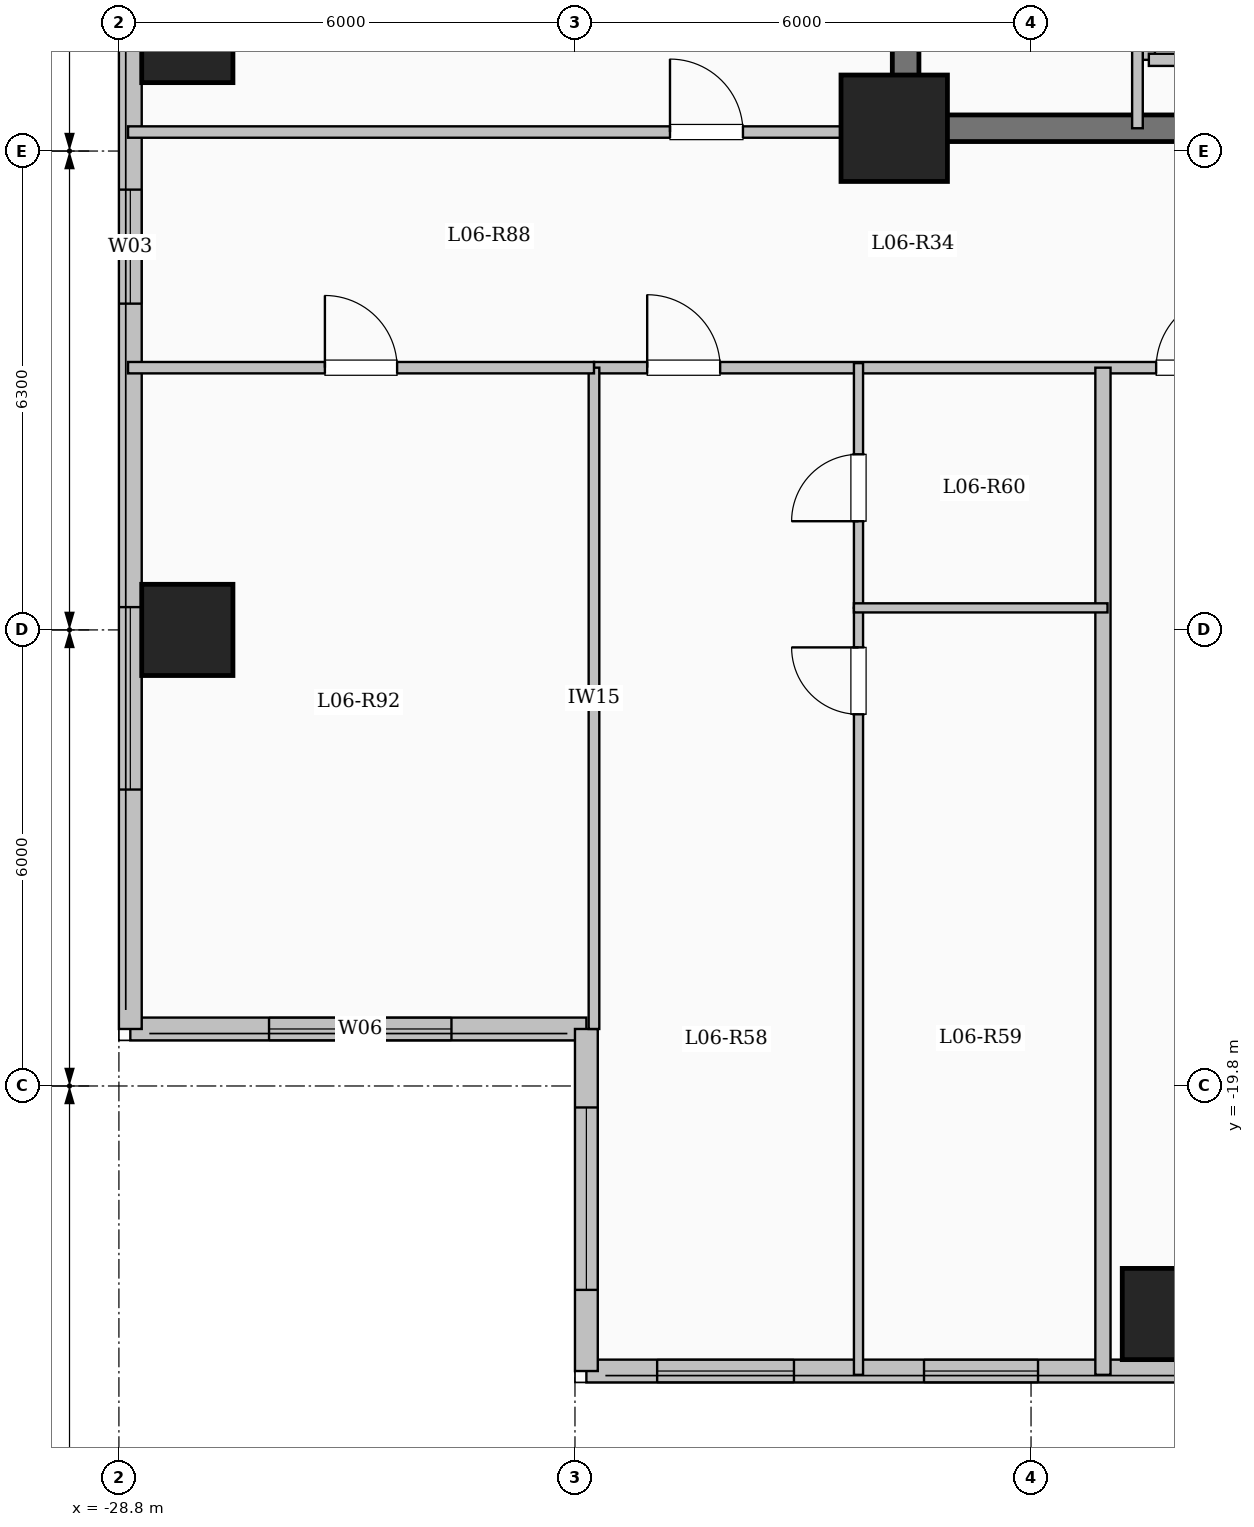
"""IFC4 building model, lengths in metres.
Left out: names, types, materials, properties, quantities, classifications, styles, units other than length and angle.
Written with IfcOpenShell. Run it as: python <this file> out.ifc"""

import sys

from ifc_helpers import new_model, si_unit, direction, frame, frame_2d, origin, origin_2d, place, context, subcontext, project, spatial, rectangle, extrude, element, fill, save


model = new_model("IFC4")
c1 = context("Model", 3, precision=1e-05, world=origin(), true_north=direction((0.0, 1.0)))
c2 = subcontext(c1, "Body", "Model", "MODEL_VIEW")
j1 = project(units=[si_unit("LENGTHUNIT", "METRE"), si_unit("PLANEANGLEUNIT", "RADIAN")], contexts=[c1])
p1 = place(None, origin())
s1 = spatial("IfcSite", under=j1, at=p1, CompositionType="ELEMENT")
p2 = place(p1, origin())
s2 = spatial("IfcBuilding", under=s1, at=p2, CompositionType="ELEMENT")
p3 = place(p2, frame((0.0, 0.0, 27.35)))
s3 = spatial("IfcBuildingStorey", under=s2, at=p3, CompositionType="ELEMENT", Elevation=27.35)
p4 = place(p3, frame((-18.6, -7.2, 0.0), z_axis=(0.0, 0.0, 1.0), x_axis=(1.0, 0.0, 0.0)))
e1 = element("IfcColumn", 1, at=p4, inside=s3, PredefinedType="COLUMN", context=c2, shape_type="SweptSolid", body=[
    extrude(rectangle(XDim=1.4, YDim=1.4, at=origin_2d()), origin(), (0.0, 0.0, 1.0), 3.35),
])
for number, where, z_axis, x_axis in (
    (2, (-15.0, -22.8, 0.0), (0.0, 0.0, 1.0), (1.0, 0.0, 0.0)),
    (3, (-27.9, -13.8, 0.0), (0.0, 0.0, 1.0), (1.0, 0.0, 0.0)),
    (4, (-27.9, -6.0, 0.0), (0.0, 0.0, 1.0), (1.0, 0.0, 0.0)),
):
    element("IfcColumn", number, at=place(p3, frame(where, z_axis=z_axis, x_axis=x_axis)), inside=s3, PredefinedType="COLUMN", context=c2, shape_type="SweptSolid", body=[
        extrude(rectangle(XDim=1.2, YDim=1.2, at=origin_2d()), origin(), (0.0, 0.0, 1.0), 3.35),
    ])
p5 = place(p3, frame((-22.65, -19.05, 0.0), z_axis=(0.0, 0.0, 1.0), x_axis=(-1.0, 0.0, 0.0)))
e5 = element("IfcWall", 5, at=p5, inside=s3, PredefinedType="SOLIDWALL", context=c2, shape_type="SweptSolid", body=[
    extrude(rectangle(XDim=6.0, YDim=0.3, at=frame_2d((3.0, 0.0))), origin(), (0.0, 0.0, 1.0), 3.1),
])
p6 = place(p5, frame((1.775, 0.0, 0.9)))
e6 = element("IfcOpeningElement", 6, at=p6, cuts=e5, PredefinedType="OPENING", context=c2, shape_type="SweptSolid", body=[
    extrude(rectangle(XDim=2.4, YDim=1.8, at=frame_2d((1.2, 0.9))), frame((0.0, 0.16, 0.0), z_axis=(0.0, -1.0, 0.0), x_axis=(1.0, 0.0, 0.0)), (0.0, 0.0, 1.0), 0.32),
])
p7 = place(p3, frame((-28.65, -19.05, 0.0), z_axis=(0.0, 0.0, 1.0), x_axis=(0.0, 1.0, 0.0)))
e7 = element("IfcWall", 7, at=p7, inside=s3, PredefinedType="SOLIDWALL", context=c2, shape_type="SweptSolid", body=[
    extrude(rectangle(XDim=38.1, YDim=0.3, at=frame_2d((19.05, 0.0))), origin(), (0.0, 0.0, 1.0), 3.1),
])
p8 = place(p7, frame((3.15, 0.0, 0.9)))
e8 = element("IfcOpeningElement", 8, at=p8, cuts=e7, PredefinedType="OPENING", context=c2, shape_type="SweptSolid", body=[
    extrude(rectangle(XDim=2.4, YDim=1.8, at=frame_2d((1.2, 0.9))), frame((0.0, 0.16, 0.0), z_axis=(0.0, -1.0, 0.0), x_axis=(1.0, 0.0, 0.0)), (0.0, 0.0, 1.0), 0.32),
])
p9 = place(p7, frame((9.542, 0.0, 0.9)))
e9 = element("IfcOpeningElement", 9, at=p9, cuts=e7, PredefinedType="OPENING", context=c2, shape_type="SweptSolid", body=[
    extrude(rectangle(XDim=1.5, YDim=1.65, at=frame_2d((0.75, 0.825))), frame((0.0, 0.16, 0.0), z_axis=(0.0, -1.0, 0.0), x_axis=(1.0, 0.0, 0.0)), (0.0, 0.0, 1.0), 0.32),
])
p10 = place(p7, frame((14.95, 0.0, 0.9)))
e10 = element("IfcOpeningElement", 10, at=p10, cuts=e7, PredefinedType="OPENING", context=c2, shape_type="SweptSolid", body=[
    extrude(rectangle(XDim=2.4, YDim=1.8, at=frame_2d((1.2, 0.9))), frame((0.0, 0.16, 0.0), z_axis=(0.0, -1.0, 0.0), x_axis=(1.0, 0.0, 0.0)), (0.0, 0.0, 1.0), 0.32),
])
p11 = place(p7, frame((21.375, 0.0, 0.9)))
e11 = element("IfcOpeningElement", 11, at=p11, cuts=e7, PredefinedType="OPENING", context=c2, shape_type="SweptSolid", body=[
    extrude(rectangle(XDim=1.8, YDim=1.65, at=frame_2d((0.9, 0.825))), frame((0.0, 0.16, 0.0), z_axis=(0.0, -1.0, 0.0), x_axis=(1.0, 0.0, 0.0)), (0.0, 0.0, 1.0), 0.32),
])
p12 = place(p7, frame((25.925, 0.0, 0.9)))
e12 = element("IfcOpeningElement", 12, at=p12, cuts=e7, PredefinedType="OPENING", context=c2, shape_type="SweptSolid", body=[
    extrude(rectangle(XDim=2.0, YDim=1.7, at=frame_2d((1.0, 0.85))), frame((0.0, 0.16, 0.0), z_axis=(0.0, -1.0, 0.0), x_axis=(1.0, 0.0, 0.0)), (0.0, 0.0, 1.0), 0.32),
])
p13 = place(p7, frame((30.175, 0.0, 0.95)))
e13 = element("IfcOpeningElement", 13, at=p13, cuts=e7, PredefinedType="OPENING", context=c2, shape_type="SweptSolid", body=[
    extrude(rectangle(XDim=1.0, YDim=1.5, at=frame_2d((0.5, 0.75))), frame((0.0, 0.16, 0.0), z_axis=(0.0, -1.0, 0.0), x_axis=(1.0, 0.0, 0.0)), (0.0, 0.0, 1.0), 0.32),
])
p14 = place(p7, frame((33.85, 0.0, 0.9)))
e14 = element("IfcOpeningElement", 14, at=p14, cuts=e7, PredefinedType="OPENING", context=c2, shape_type="SweptSolid", body=[
    extrude(rectangle(XDim=2.0, YDim=1.7, at=frame_2d((1.0, 0.85))), frame((0.0, 0.16, 0.0), z_axis=(0.0, -1.0, 0.0), x_axis=(1.0, 0.0, 0.0)), (0.0, 0.0, 1.0), 0.32),
])
p15 = place(p3, frame((-7.35, -23.55, 0.0), z_axis=(0.0, 0.0, 1.0), x_axis=(-1.0, 0.0, 0.0)))
e15 = element("IfcWall", 15, at=p15, inside=s3, PredefinedType="SOLIDWALL", context=c2, shape_type="SweptSolid", body=[
    extrude(rectangle(XDim=15.3, YDim=0.3, at=frame_2d((7.65, 0.0))), origin(), (0.0, 0.0, 1.0), 3.1),
])
p16 = place(p15, frame((0.147, 0.0, 0.95)))
e16 = element("IfcOpeningElement", 16, at=p16, cuts=e15, PredefinedType="OPENING", context=c2, shape_type="SweptSolid", body=[
    extrude(rectangle(XDim=0.85, YDim=1.5, at=frame_2d((0.425, 0.75))), frame((0.0, 0.16, 0.0), z_axis=(0.0, -1.0, 0.0), x_axis=(1.0, 0.0, 0.0)), (0.0, 0.0, 1.0), 0.32),
])
p17 = place(p15, frame((2.085, 0.0, 0.9)))
e17 = element("IfcOpeningElement", 17, at=p17, cuts=e15, PredefinedType="OPENING", context=c2, shape_type="SweptSolid", body=[
    extrude(rectangle(XDim=1.8, YDim=1.65, at=frame_2d((0.9, 0.825))), frame((0.0, 0.16, 0.0), z_axis=(0.0, -1.0, 0.0), x_axis=(1.0, 0.0, 0.0)), (0.0, 0.0, 1.0), 0.32),
])
p18 = place(p15, frame((5.722, 0.0, 0.9)))
e18 = element("IfcOpeningElement", 18, at=p18, cuts=e15, PredefinedType="OPENING", context=c2, shape_type="SweptSolid", body=[
    extrude(rectangle(XDim=1.8, YDim=1.65, at=frame_2d((0.9, 0.825))), frame((0.0, 0.16, 0.0), z_axis=(0.0, -1.0, 0.0), x_axis=(1.0, 0.0, 0.0)), (0.0, 0.0, 1.0), 0.32),
])
p19 = place(p15, frame((9.358, 0.0, 0.9)))
e19 = element("IfcOpeningElement", 19, at=p19, cuts=e15, PredefinedType="OPENING", context=c2, shape_type="SweptSolid", body=[
    extrude(rectangle(XDim=1.5, YDim=1.65, at=frame_2d((0.75, 0.825))), frame((0.0, 0.16, 0.0), z_axis=(0.0, -1.0, 0.0), x_axis=(1.0, 0.0, 0.0)), (0.0, 0.0, 1.0), 0.32),
])
p20 = place(p15, frame((12.569, 0.0, 0.9)))
e20 = element("IfcOpeningElement", 20, at=p20, cuts=e15, PredefinedType="OPENING", context=c2, shape_type="SweptSolid", body=[
    extrude(rectangle(XDim=1.8, YDim=1.65, at=frame_2d((0.9, 0.825))), frame((0.0, 0.16, 0.0), z_axis=(0.0, -1.0, 0.0), x_axis=(1.0, 0.0, 0.0)), (0.0, 0.0, 1.0), 0.32),
])
p21 = place(p3, frame((-22.65, -23.55, 0.0), z_axis=(0.0, 0.0, 1.0), x_axis=(0.0, 1.0, 0.0)))
e21 = element("IfcWall", 21, at=p21, inside=s3, PredefinedType="SOLIDWALL", context=c2, shape_type="SweptSolid", body=[
    extrude(rectangle(XDim=4.5, YDim=0.3, at=frame_2d((2.25, 0.0))), origin(), (0.0, 0.0, 1.0), 3.1),
])
p22 = place(p21, frame((1.067, 0.0, 0.9)))
e22 = element("IfcOpeningElement", 22, at=p22, cuts=e21, PredefinedType="OPENING", context=c2, shape_type="SweptSolid", body=[
    extrude(rectangle(XDim=2.4, YDim=1.8, at=frame_2d((1.2, 0.9))), frame((0.0, 0.16, 0.0), z_axis=(0.0, -1.0, 0.0), x_axis=(1.0, 0.0, 0.0)), (0.0, 0.0, 1.0), 0.32),
])
p23 = place(p3, frame((-15.25, -6.3, 0.0), z_axis=(0.0, 0.0, 1.0), x_axis=(0.0, 1.0, 0.0)))
e23 = element("IfcWall", 23, at=p23, inside=s3, PredefinedType="SOLIDWALL", context=c2, shape_type="SweptSolid", body=[
    extrude(rectangle(XDim=2.6, YDim=0.16, at=frame_2d((1.3, 0.0))), origin(), (0.0, 0.0, 1.0), 3.1),
])
p24 = place(p3, frame((-15.25, -6.3, 0.0), z_axis=(0.0, 0.0, 1.0), x_axis=(1.0, 0.0, 0.0)))
e24 = element("IfcWall", 24, at=p24, inside=s3, PredefinedType="SOLIDWALL", context=c2, shape_type="SweptSolid", body=[
    extrude(rectangle(XDim=2.3, YDim=0.16, at=frame_2d((1.15, 0.0))), origin(), (0.0, 0.0, 1.0), 3.1),
])
p25 = place(p3, frame((-18.45, -7.375, 0.0), z_axis=(0.0, 0.0, 1.0), x_axis=(0.0, 1.0, 0.0)))
e25 = element("IfcWall", 25, at=p25, inside=s3, PredefinedType="SHEAR", context=c2, shape_type="SweptSolid", body=[
    extrude(rectangle(XDim=14.05, YDim=0.35, at=frame_2d((7.025, 0.0))), origin(), (0.0, 0.0, 1.0), 3.35),
])
p26 = place(p3, frame((-18.625, -7.2, 0.0), z_axis=(0.0, 0.0, 1.0), x_axis=(1.0, 0.0, 0.0)))
e26 = element("IfcWall", 26, at=p26, inside=s3, PredefinedType="SHEAR", context=c2, shape_type="SweptSolid", body=[
    extrude(rectangle(XDim=8.55, YDim=0.35, at=frame_2d((4.275, 0.0))), origin(), (0.0, 0.0, 1.0), 3.35),
])
p27 = place(p3, frame((-15.4, -7.2, 0.0), z_axis=(0.0, 0.0, 1.0), x_axis=(0.0, 1.0, 0.0)))
e27 = element("IfcWall", 27, at=p27, inside=s3, PredefinedType="PARTITIONING", context=c2, shape_type="SweptSolid", body=[
    extrude(rectangle(XDim=10.45, YDim=0.14, at=frame_2d((5.225, 0.0))), origin(), (0.0, 0.0, 1.0), 3.1),
])
p28 = place(p27, frame((9.25, 0.0, 0.0)))
e28 = element("IfcOpeningElement", 28, at=p28, cuts=e27, PredefinedType="OPENING", context=c2, shape_type="SweptSolid", body=[
    extrude(rectangle(XDim=0.9, YDim=2.08, at=frame_2d((0.45, 1.04))), frame((0.0, 0.08, 0.0), z_axis=(0.0, -1.0, 0.0), x_axis=(1.0, 0.0, 0.0)), (0.0, 0.0, 1.0), 0.16),
])
p29 = place(p3, frame((-22.55, -10.35, 0.0), z_axis=(0.0, 0.0, 1.0), x_axis=(1.0, 0.0, 0.0)))
e29 = element("IfcWall", 29, at=p29, inside=s3, PredefinedType="PARTITIONING", context=c2, shape_type="SweptSolid", body=[
    extrude(rectangle(XDim=14.0, YDim=0.15, at=frame_2d((7.0, 0.0))), origin(), (0.0, 0.0, 1.0), 3.1),
])
p30 = place(p29, frame((0.7, 0.0, 0.0)))
e30 = element("IfcOpeningElement", 30, at=p30, cuts=e29, PredefinedType="OPENING", context=c2, shape_type="SweptSolid", body=[
    extrude(rectangle(XDim=0.96, YDim=2.15, at=frame_2d((0.48, 1.075))), frame((0.0, 0.085, 0.0), z_axis=(0.0, -1.0, 0.0), x_axis=(1.0, 0.0, 0.0)), (0.0, 0.0, 1.0), 0.17),
])
p31 = place(p29, frame((7.396, 0.0, 0.0)))
e31 = element("IfcOpeningElement", 31, at=p31, cuts=e29, PredefinedType="OPENING", context=c2, shape_type="SweptSolid", body=[
    extrude(rectangle(XDim=0.96, YDim=2.15, at=frame_2d((0.48, 1.075))), frame((0.0, 0.085, 0.0), z_axis=(0.0, -1.0, 0.0), x_axis=(1.0, 0.0, 0.0)), (0.0, 0.0, 1.0), 0.17),
])
p32 = place(p3, frame((-15.854, -23.6, 0.0), z_axis=(0.0, 0.0, 1.0), x_axis=(0.0, 1.0, 0.0)))
e32 = element("IfcWall", 32, at=p32, inside=s3, PredefinedType="SOLIDWALL", context=c2, shape_type="SweptSolid", body=[
    extrude(rectangle(XDim=13.25, YDim=0.2, at=frame_2d((6.625, 0.0))), origin(), (0.0, 0.0, 1.0), 3.1),
])
p33 = place(p3, frame((-19.07, -23.6, 0.0), z_axis=(0.0, 0.0, 1.0), x_axis=(0.0, 1.0, 0.0)))
e33 = element("IfcWall", 33, at=p33, inside=s3, PredefinedType="PARTITIONING", context=c2, shape_type="SweptSolid", body=[
    extrude(rectangle(XDim=10.09, YDim=0.12, at=frame_2d((5.045, 0.0))), origin(), (0.0, 0.0, 1.0), 3.1),
])
p34 = place(p33, frame((8.69, 0.0, 0.0)))
e34 = element("IfcOpeningElement", 34, at=p34, cuts=e33, PredefinedType="OPENING", context=c2, shape_type="SweptSolid", body=[
    extrude(rectangle(XDim=0.88, YDim=2.1, at=frame_2d((0.44, 1.05))), frame((0.0, 0.07, 0.0), z_axis=(0.0, -1.0, 0.0), x_axis=(1.0, 0.0, 0.0)), (0.0, 0.0, 1.0), 0.14),
])
p35 = place(p3, frame((-19.07, -13.51, 0.0), z_axis=(0.0, 0.0, 1.0), x_axis=(0.0, 1.0, 0.0)))
e35 = element("IfcWall", 35, at=p35, inside=s3, PredefinedType="PARTITIONING", context=c2, shape_type="SweptSolid", body=[
    extrude(rectangle(XDim=3.22, YDim=0.12, at=frame_2d((1.61, 0.0))), origin(), (0.0, 0.0, 1.0), 3.1),
])
p36 = place(p35, frame((1.14, 0.0, 0.0)))
e36 = element("IfcOpeningElement", 36, at=p36, cuts=e35, PredefinedType="OPENING", context=c2, shape_type="SweptSolid", body=[
    extrude(rectangle(XDim=0.88, YDim=2.1, at=frame_2d((0.44, 1.05))), frame((0.0, 0.07, 0.0), z_axis=(0.0, -1.0, 0.0), x_axis=(1.0, 0.0, 0.0)), (0.0, 0.0, 1.0), 0.14),
])
p37 = place(p3, frame((-19.13, -13.51, 0.0), z_axis=(0.0, 0.0, 1.0), x_axis=(1.0, 0.0, 0.0)))
e37 = element("IfcWall", 37, at=p37, inside=s3, PredefinedType="PARTITIONING", context=c2, shape_type="SweptSolid", body=[
    extrude(rectangle(XDim=3.336, YDim=0.12, at=frame_2d((1.668, 0.0))), origin(), (0.0, 0.0, 1.0), 3.1),
])
p38 = place(p3, frame((-28.68, -7.25, 0.0), z_axis=(0.0, 0.0, 1.0), x_axis=(1.0, 0.0, 0.0)))
e38 = element("IfcWall", 38, at=p38, inside=s3, PredefinedType="PARTITIONING", context=c2, shape_type="SweptSolid", body=[
    extrude(rectangle(XDim=10.23, YDim=0.15, at=frame_2d((5.115, 0.0))), origin(), (0.0, 0.0, 1.0), 3.1),
])
p39 = place(p38, frame((7.13, 0.0, 0.0)))
e39 = element("IfcOpeningElement", 39, at=p39, cuts=e38, PredefinedType="OPENING", context=c2, shape_type="SweptSolid", body=[
    extrude(rectangle(XDim=0.96, YDim=2.15, at=frame_2d((0.48, 1.075))), frame((0.0, 0.085, 0.0), z_axis=(0.0, -1.0, 0.0), x_axis=(1.0, 0.0, 0.0)), (0.0, 0.0, 1.0), 0.17),
])
p40 = place(p3, frame((-22.55, -19.05, 0.0), z_axis=(0.0, 0.0, 1.0), x_axis=(0.0, 1.0, 0.0)))
e40 = element("IfcWall", 40, at=p40, inside=s3, PredefinedType="PARTITIONING", context=c2, shape_type="SweptSolid", body=[
    extrude(rectangle(XDim=8.7, YDim=0.14, at=frame_2d((4.35, 0.0))), origin(), (0.0, 0.0, 1.0), 3.1),
])
p41 = place(p3, frame((-28.68, -10.35, 0.0), z_axis=(0.0, 0.0, 1.0), x_axis=(1.0, 0.0, 0.0)))
e41 = element("IfcWall", 41, at=p41, inside=s3, PredefinedType="PARTITIONING", context=c2, shape_type="SweptSolid", body=[
    extrude(rectangle(XDim=6.13, YDim=0.15, at=frame_2d((3.065, 0.0))), origin(), (0.0, 0.0, 1.0), 3.1),
])
p42 = place(p41, frame((2.59, 0.0, 0.0)))
e42 = element("IfcOpeningElement", 42, at=p42, cuts=e41, PredefinedType="OPENING", context=c2, shape_type="SweptSolid", body=[
    extrude(rectangle(XDim=0.95, YDim=2.15, at=frame_2d((0.475, 1.075))), frame((0.0, 0.085, 0.0), z_axis=(0.0, -1.0, 0.0), x_axis=(1.0, 0.0, 0.0)), (0.0, 0.0, 1.0), 0.17),
])
p43 = place(p6, origin())
e43 = element("IfcWindow", 43, at=p43, inside=s3, PartitioningType="SINGLE_PANEL", PredefinedType="WINDOW", context=c2, shape_type="SweptSolid", body=[
    extrude(rectangle(XDim=2.4, YDim=1.8, at=frame_2d((1.2, 0.9))), frame((0.0, 0.03, 0.0), z_axis=(0.0, -1.0, 0.0), x_axis=(1.0, 0.0, 0.0)), (0.0, 0.0, 1.0), 0.06),
])
fill(e6, e43)
p44 = place(p8, origin())
e44 = element("IfcWindow", 44, at=p44, inside=s3, PartitioningType="SINGLE_PANEL", PredefinedType="WINDOW", context=c2, shape_type="SweptSolid", body=[
    extrude(rectangle(XDim=2.4, YDim=1.8, at=frame_2d((1.2, 0.9))), frame((0.0, 0.03, 0.0), z_axis=(0.0, -1.0, 0.0), x_axis=(1.0, 0.0, 0.0)), (0.0, 0.0, 1.0), 0.06),
])
fill(e8, e44)
p45 = place(p9, origin())
e45 = element("IfcWindow", 45, at=p45, inside=s3, PartitioningType="SINGLE_PANEL", PredefinedType="WINDOW", context=c2, shape_type="SweptSolid", body=[
    extrude(rectangle(XDim=1.5, YDim=1.65, at=frame_2d((0.75, 0.825))), frame((0.0, 0.03, 0.0), z_axis=(0.0, -1.0, 0.0), x_axis=(1.0, 0.0, 0.0)), (0.0, 0.0, 1.0), 0.06),
])
fill(e9, e45)
p46 = place(p19, origin())
e46 = element("IfcWindow", 46, at=p46, inside=s3, PartitioningType="SINGLE_PANEL", PredefinedType="WINDOW", context=c2, shape_type="SweptSolid", body=[
    extrude(rectangle(XDim=1.5, YDim=1.65, at=frame_2d((0.75, 0.825))), frame((0.0, 0.03, 0.0), z_axis=(0.0, -1.0, 0.0), x_axis=(1.0, 0.0, 0.0)), (0.0, 0.0, 1.0), 0.06),
])
fill(e19, e46)
p47 = place(p20, origin())
e47 = element("IfcWindow", 47, at=p47, inside=s3, PartitioningType="SINGLE_PANEL", PredefinedType="WINDOW", context=c2, shape_type="SweptSolid", body=[
    extrude(rectangle(XDim=1.8, YDim=1.65, at=frame_2d((0.9, 0.825))), frame((0.0, 0.03, 0.0), z_axis=(0.0, -1.0, 0.0), x_axis=(1.0, 0.0, 0.0)), (0.0, 0.0, 1.0), 0.06),
])
fill(e20, e47)
p48 = place(p22, origin())
e48 = element("IfcWindow", 48, at=p48, inside=s3, PartitioningType="SINGLE_PANEL", PredefinedType="WINDOW", context=c2, shape_type="SweptSolid", body=[
    extrude(rectangle(XDim=2.4, YDim=1.8, at=frame_2d((1.2, 0.9))), frame((0.0, 0.03, 0.0), z_axis=(0.0, -1.0, 0.0), x_axis=(1.0, 0.0, 0.0)), (0.0, 0.0, 1.0), 0.06),
])
fill(e22, e48)
p49 = place(p30, origin())
e49 = element("IfcDoor", 49, at=p49, inside=s3, OperationType="SINGLE_SWING_LEFT", PredefinedType="DOOR", context=c2, shape_type="SweptSolid", body=[
    extrude(rectangle(XDim=0.96, YDim=2.15, at=frame_2d((0.48, 1.075))), frame((0.0, 0.025, 0.0), z_axis=(0.0, -1.0, 0.0), x_axis=(1.0, 0.0, 0.0)), (0.0, 0.0, 1.0), 0.05),
])
fill(e30, e49)
p50 = place(p34, origin())
e50 = element("IfcDoor", 50, at=p50, inside=s3, OperationType="SINGLE_SWING_RIGHT", PredefinedType="DOOR", context=c2, shape_type="SweptSolid", body=[
    extrude(rectangle(XDim=0.88, YDim=2.1, at=frame_2d((0.44, 1.05))), frame((0.0, 0.025, 0.0), z_axis=(0.0, -1.0, 0.0), x_axis=(1.0, 0.0, 0.0)), (0.0, 0.0, 1.0), 0.05),
])
fill(e34, e50)
p51 = place(p36, origin())
e51 = element("IfcDoor", 51, at=p51, inside=s3, OperationType="SINGLE_SWING_LEFT", PredefinedType="DOOR", context=c2, shape_type="SweptSolid", body=[
    extrude(rectangle(XDim=0.88, YDim=2.1, at=frame_2d((0.44, 1.05))), frame((0.0, 0.025, 0.0), z_axis=(0.0, -1.0, 0.0), x_axis=(1.0, 0.0, 0.0)), (0.0, 0.0, 1.0), 0.05),
])
fill(e36, e51)
p52 = place(p31, origin())
e52 = element("IfcDoor", 52, at=p52, inside=s3, OperationType="SINGLE_SWING_RIGHT", PredefinedType="DOOR", context=c2, shape_type="SweptSolid", body=[
    extrude(rectangle(XDim=0.96, YDim=2.15, at=frame_2d((0.48, 1.075))), frame((0.0, 0.025, 0.0), z_axis=(0.0, -1.0, 0.0), x_axis=(1.0, 0.0, 0.0)), (0.0, 0.0, 1.0), 0.05),
])
fill(e31, e52)
p53 = place(p42, origin())
e53 = element("IfcDoor", 53, at=p53, inside=s3, OperationType="SINGLE_SWING_LEFT", PredefinedType="DOOR", context=c2, shape_type="SweptSolid", body=[
    extrude(rectangle(XDim=0.95, YDim=2.15, at=frame_2d((0.475, 1.075))), frame((0.0, 0.025, 0.0), z_axis=(0.0, -1.0, 0.0), x_axis=(1.0, 0.0, 0.0)), (0.0, 0.0, 1.0), 0.05),
])
fill(e42, e53)
p54 = place(p39, origin())
e54 = element("IfcDoor", 54, at=p54, inside=s3, OperationType="SINGLE_SWING_LEFT", PredefinedType="DOOR", context=c2, shape_type="SweptSolid", body=[
    extrude(rectangle(XDim=0.96, YDim=2.15, at=frame_2d((0.48, 1.075))), frame((0.0, 0.025, 0.0), z_axis=(0.0, -1.0, 0.0), x_axis=(1.0, 0.0, 0.0)), (0.0, 0.0, 1.0), 0.05),
])
fill(e39, e54)
save(model, sys.argv[1])
